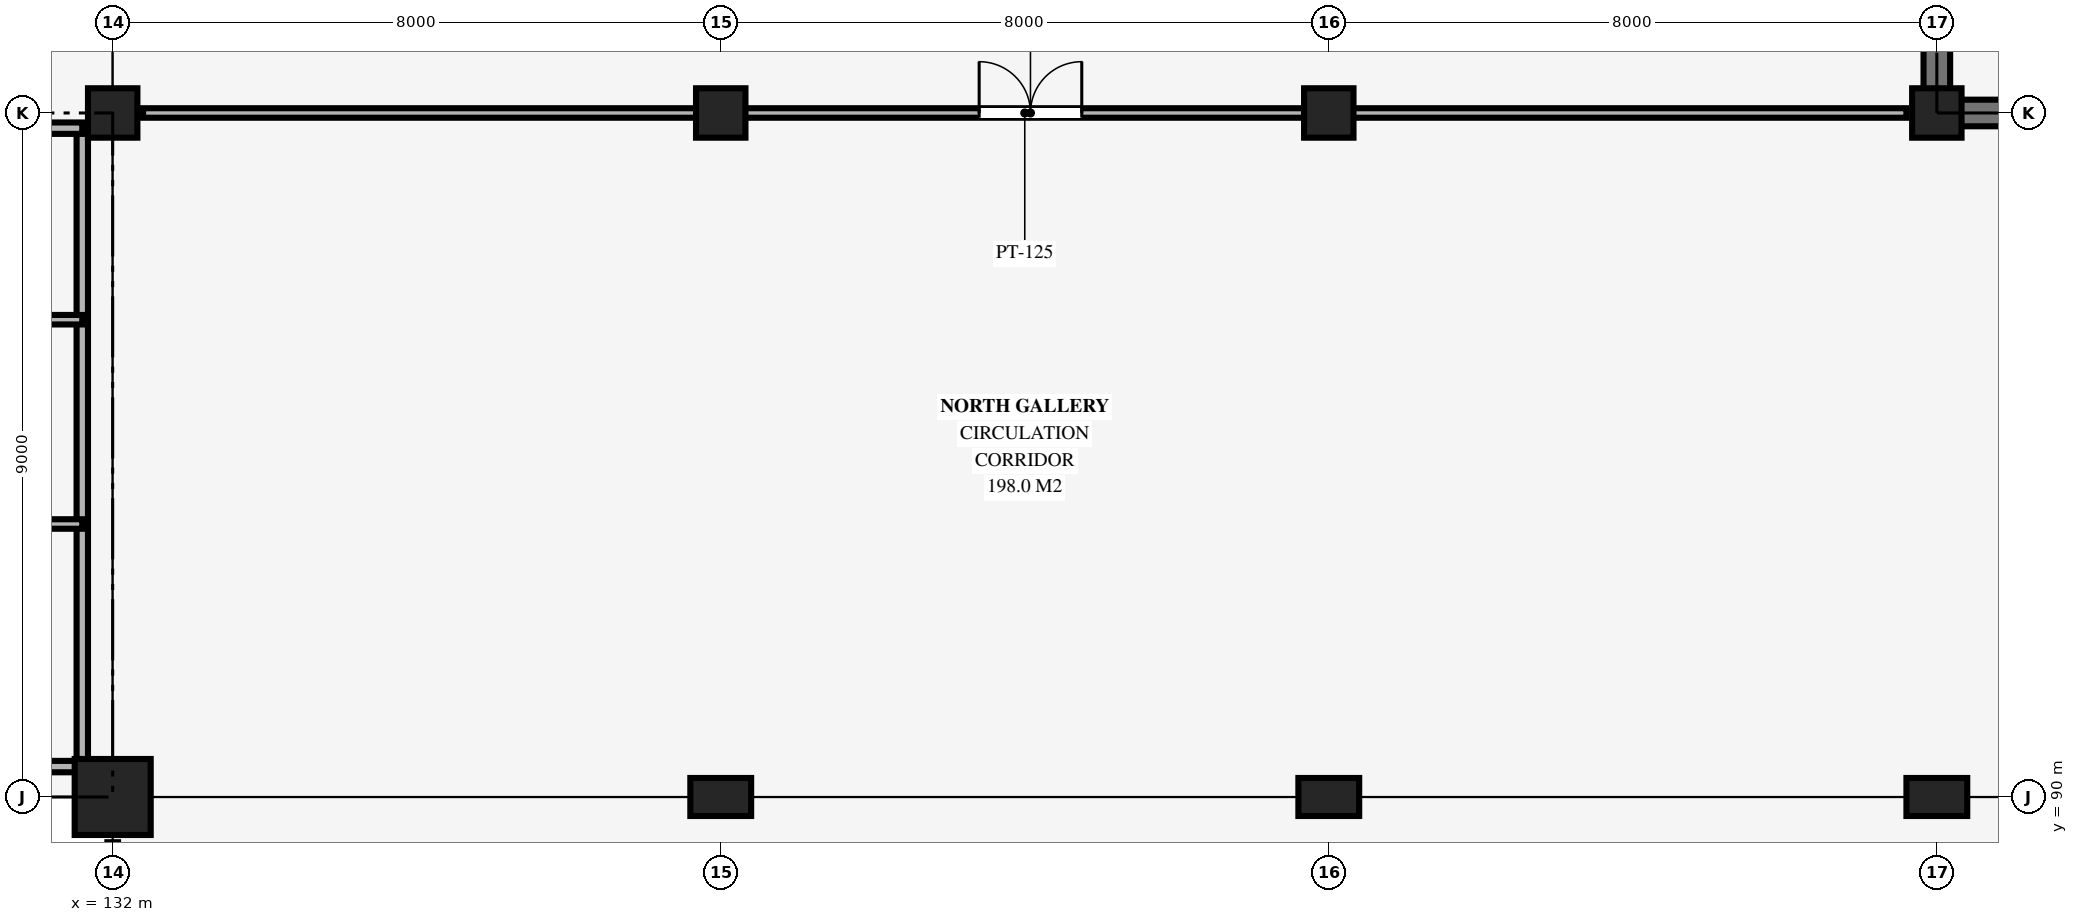
"""IFC4 building model, lengths in metres.
Left out: names, types, materials, properties, quantities, classifications, styles, units other than length and angle.
Written with IfcOpenShell. Run it as: python <this file> out.ifc"""

import sys

from ifc_helpers import new_model, si_unit, direction, frame, frame_2d, origin, origin_2d, place, context, subcontext, project, spatial, rectangle, extrude, element, fill, save


model = new_model("IFC4")
c1 = context("Model", 3, precision=1e-05, world=origin(), true_north=direction((0.0, 1.0)))
c2 = subcontext(c1, "Body", "Model", "MODEL_VIEW")
j1 = project(units=[si_unit("LENGTHUNIT", "METRE"), si_unit("PLANEANGLEUNIT", "RADIAN")], contexts=[c1])
p1 = place(None, origin())
s1 = spatial("IfcSite", under=j1, at=p1, CompositionType="ELEMENT")
p2 = place(p1, origin())
s2 = spatial("IfcBuilding", under=s1, at=p2, CompositionType="ELEMENT")
p3 = place(p2, frame((0.0, 0.0, 10.2)))
s3 = spatial("IfcBuildingStorey", under=s2, at=p3, CompositionType="ELEMENT", Elevation=10.2)
p4 = place(p3, frame((132.0, 90.0, 0.0), z_axis=(0.0, 0.0, 1.0), x_axis=(1.0, 0.0, 0.0)))
e1 = element("IfcColumn", 1, at=p4, inside=s3, PredefinedType="COLUMN", context=c2, shape_type="SweptSolid", body=[
    extrude(rectangle(XDim=1.0, YDim=1.0, at=origin_2d()), origin(), (0.0, 0.0, 1.0), 4.64),
])
p5 = place(p3, frame((132.0, 99.0, 0.0), z_axis=(0.0, 0.0, 1.0), x_axis=(1.0, 0.0, 0.0)))
e2 = element("IfcColumn", 2, at=p5, inside=s3, PredefinedType="COLUMN", context=c2, shape_type="SweptSolid", body=[
    extrude(rectangle(XDim=0.65, YDim=0.65, at=origin_2d()), origin(), (0.0, 0.0, 1.0), 4.64),
])
p6 = place(p3, frame((140.0, 90.0, 0.0), z_axis=(0.0, 0.0, 1.0), x_axis=(0.0, 1.0, 0.0)))
e3 = element("IfcColumn", 3, at=p6, inside=s3, PredefinedType="PILASTER", context=c2, shape_type="SweptSolid", body=[
    extrude(rectangle(XDim=0.5, YDim=0.8, at=origin_2d()), origin(), (0.0, 0.0, 1.0), 4.64),
])
p7 = place(p3, frame((140.0, 99.0, 0.0), z_axis=(0.0, 0.0, 1.0), x_axis=(1.0, 0.0, 0.0)))
e4 = element("IfcColumn", 4, at=p7, inside=s3, PredefinedType="COLUMN", context=c2, shape_type="SweptSolid", body=[
    extrude(rectangle(XDim=0.65, YDim=0.65, at=origin_2d()), origin(), (0.0, 0.0, 1.0), 4.64),
])
p8 = place(p3, frame((148.0, 90.0, 0.0), z_axis=(0.0, 0.0, 1.0), x_axis=(0.0, 1.0, 0.0)))
e5 = element("IfcColumn", 5, at=p8, inside=s3, PredefinedType="PILASTER", context=c2, shape_type="SweptSolid", body=[
    extrude(rectangle(XDim=0.5, YDim=0.8, at=origin_2d()), origin(), (0.0, 0.0, 1.0), 4.64),
])
p9 = place(p3, frame((148.0, 99.0, 0.0), z_axis=(0.0, 0.0, 1.0), x_axis=(1.0, 0.0, 0.0)))
e6 = element("IfcColumn", 6, at=p9, inside=s3, PredefinedType="COLUMN", context=c2, shape_type="SweptSolid", body=[
    extrude(rectangle(XDim=0.65, YDim=0.65, at=origin_2d()), origin(), (0.0, 0.0, 1.0), 4.64),
])
p10 = place(p3, frame((156.0, 90.0, 0.0), z_axis=(0.0, 0.0, 1.0), x_axis=(0.0, 1.0, 0.0)))
e7 = element("IfcColumn", 7, at=p10, inside=s3, PredefinedType="PILASTER", context=c2, shape_type="SweptSolid", body=[
    extrude(rectangle(XDim=0.5, YDim=0.8, at=origin_2d()), origin(), (0.0, 0.0, 1.0), 4.64),
])
p11 = place(p3, frame((156.0, 99.0, 0.0), z_axis=(0.0, 0.0, 1.0), x_axis=(1.0, 0.0, 0.0)))
e8 = element("IfcColumn", 8, at=p11, inside=s3, PredefinedType="COLUMN", context=c2, shape_type="SweptSolid", body=[
    extrude(rectangle(XDim=0.65, YDim=0.65, at=origin_2d()), origin(), (0.0, 0.0, 1.0), 4.64),
])
p12 = place(p3, frame((156.0, 99.0, 0.0), z_axis=(0.0, 0.0, 1.0), x_axis=(1.0, 0.0, 0.0)))
e9 = element("IfcWall", 9, at=p12, inside=s3, PredefinedType="SHEAR", context=c2, shape_type="SweptSolid", body=[
    extrude(rectangle(XDim=8.0, YDim=0.35, at=frame_2d((4.0, 0.0))), origin(), (0.0, 0.0, 1.0), 4.78),
])
p13 = place(p3, frame((156.0, 99.0, 0.0), z_axis=(0.0, 0.0, 1.0), x_axis=(0.0, 1.0, 0.0)))
e10 = element("IfcWall", 10, at=p13, inside=s3, PredefinedType="SHEAR", context=c2, shape_type="SweptSolid", body=[
    extrude(rectangle(XDim=9.0, YDim=0.35, at=frame_2d((4.5, 0.0))), origin(), (0.0, 0.0, 1.0), 4.78),
])
p14 = place(p3, frame((131.6, 90.4, 0.0), z_axis=(0.0, 0.0, 1.0), x_axis=(0.0, 1.0, 0.0)))
e11 = element("IfcWall", 11, at=p14, inside=s3, PredefinedType="PARTITIONING", context=c2, shape_type="SweptSolid", body=[
    extrude(rectangle(XDim=8.4, YDim=0.15, at=frame_2d((4.2, 0.0))), origin(), (0.0, 0.0, 1.0), 3.65),
])
for number, where, z_axis, x_axis in (
    (12, (122.6, 98.8, 0.0), (0.0, 0.0, 1.0), (1.0, 0.0, 0.0)),
    (13, (122.6, 90.4, 0.0), (0.0, 0.0, 1.0), (1.0, 0.0, 0.0)),
):
    element("IfcWall", number, at=place(p3, frame(where, z_axis=z_axis, x_axis=x_axis)), inside=s3, PredefinedType="PARTITIONING", context=c2, shape_type="SweptSolid", body=[
        extrude(rectangle(XDim=9.0, YDim=0.15, at=frame_2d((4.5, 0.0))), origin(), (0.0, 0.0, 1.0), 3.65),
    ])
for number, where, z_axis, x_axis in (
    (14, (122.6, 93.592, 0.0), (0.0, 0.0, 1.0), (1.0, 0.0, 0.0)),
    (15, (122.6, 96.28, 0.0), (0.0, 0.0, 1.0), (1.0, 0.0, 0.0)),
):
    element("IfcWall", number, at=place(p3, frame(where, z_axis=z_axis, x_axis=x_axis)), inside=s3, PredefinedType="PARTITIONING", context=c2, shape_type="SweptSolid", body=[
        extrude(rectangle(XDim=9.0, YDim=0.125, at=frame_2d((4.5, 0.0))), origin(), (0.0, 0.0, 1.0), 3.65),
    ])
p15 = place(p3, frame((132.4, 99.0, 0.0), z_axis=(0.0, 0.0, 1.0), x_axis=(1.0, 0.0, 0.0)))
e16 = element("IfcWall", 16, at=p15, inside=s3, PredefinedType="PARTITIONING", context=c2, shape_type="SweptSolid", body=[
    extrude(rectangle(XDim=23.2, YDim=0.125, at=frame_2d((11.6, 0.0))), origin(), (0.0, 0.0, 1.0), 3.65),
])
p16 = place(p15, frame((11.0, 0.0, 0.0)))
e17 = element("IfcOpeningElement", 17, at=p16, cuts=e16, PredefinedType="OPENING", context=c2, shape_type="SweptSolid", body=[
    extrude(rectangle(XDim=1.35, YDim=2.15, at=frame_2d((0.675, 1.075))), frame((0.0, 0.073, 0.0), z_axis=(0.0, -1.0, 0.0), x_axis=(1.0, 0.0, 0.0)), (0.0, 0.0, 1.0), 0.145),
])
p17 = place(p16, origin())
e18 = element("IfcDoor", 18, at=p17, inside=s3, OperationType="DOUBLE_DOOR_SINGLE_SWING", PredefinedType="DOOR", context=c2, shape_type="SweptSolid", body=[
    extrude(rectangle(XDim=1.35, YDim=2.15, at=frame_2d((0.675, 1.075))), frame((0.0, 0.025, 0.0), z_axis=(0.0, -1.0, 0.0), x_axis=(1.0, 0.0, 0.0)), (0.0, 0.0, 1.0), 0.05),
])
fill(e17, e18)
save(model, sys.argv[1])
